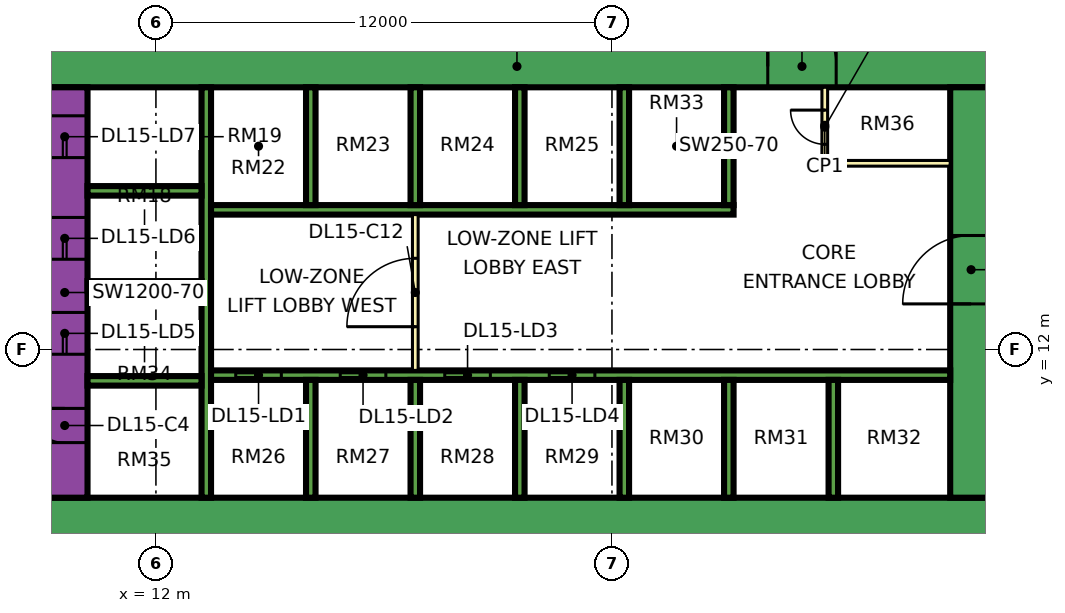
"""IFC4 building model, lengths in metres.
Left out: names, types, materials, properties, quantities, classifications, styles, units other than length and angle.
Written with IfcOpenShell. Run it as: python <this file> out.ifc"""

import sys

from ifc_helpers import new_model, si_unit, direction, frame, frame_2d, origin, place, context, subcontext, project, spatial, rectangle, extrude, element, fill, save


model = new_model("IFC4")
c1 = context("Model", 3, precision=1e-05, world=origin(), true_north=direction((0.0, 1.0)))
c2 = subcontext(c1, "Body", "Model", "MODEL_VIEW")
j1 = project(units=[si_unit("LENGTHUNIT", "METRE"), si_unit("PLANEANGLEUNIT", "RADIAN")], contexts=[c1])
p1 = place(None, origin())
s1 = spatial("IfcSite", under=j1, at=p1, CompositionType="ELEMENT")
p2 = place(p1, origin())
s2 = spatial("IfcBuilding", under=s1, at=p2, CompositionType="ELEMENT")
p3 = place(p2, frame((0.0, 0.0, 71.4)))
s3 = spatial("IfcBuildingStorey", under=s2, at=p3, CompositionType="ELEMENT", Elevation=71.4)
p4 = place(p3, frame((9.0, 7.55, 0.0), z_axis=(0.0, 0.0, 1.0), x_axis=(1.0, 0.0, 0.0)))
e1 = element("IfcWall", 1, at=p4, inside=s3, PredefinedType="SHEAR", context=c2, shape_type="SweptSolid", body=[
    extrude(rectangle(XDim=25.0, YDim=1.1, at=frame_2d((12.5, 0.0))), origin(), (0.0, 0.0, 1.0), 3.75),
])
p5 = place(p3, frame((9.0, 19.45, 0.0), z_axis=(0.0, 0.0, 1.0), x_axis=(1.0, 0.0, 0.0)))
e2 = element("IfcWall", 2, at=p5, inside=s3, PredefinedType="SHEAR", context=c2, shape_type="SweptSolid", body=[
    extrude(rectangle(XDim=25.0, YDim=1.1, at=frame_2d((12.5, 0.0))), origin(), (0.0, 0.0, 1.0), 3.75),
])
p6 = place(p5, frame((19.1, 0.0, 0.0)))
e3 = element("IfcOpeningElement", 3, at=p6, cuts=e2, PredefinedType="OPENING", context=c2, shape_type="SweptSolid", body=[
    extrude(rectangle(XDim=1.8, YDim=2.4, at=frame_2d((0.9, 1.2))), frame((0.0, 0.56, 0.0), z_axis=(0.0, -1.0, 0.0), x_axis=(1.0, 0.0, 0.0)), (0.0, 0.0, 1.0), 1.12),
])
p7 = place(p3, frame((9.6, 8.1, 0.0), z_axis=(0.0, 0.0, 1.0), x_axis=(0.0, 1.0, 0.0)))
e4 = element("IfcWall", 4, at=p7, inside=s3, PredefinedType="SHEAR", context=c2, shape_type="SweptSolid", body=[
    extrude(rectangle(XDim=10.8, YDim=1.2, at=frame_2d((5.4, 0.0))), origin(), (0.0, 0.0, 1.0), 3.75),
])
p8 = place(p7, frame((3.775, 0.0, 0.0)))
e5 = element("IfcOpeningElement", 5, at=p8, cuts=e4, PredefinedType="OPENING", context=c2, shape_type="SweptSolid", body=[
    extrude(rectangle(XDim=1.1, YDim=2.2, at=frame_2d((0.55, 1.1))), frame((0.0, 0.61, 0.0), z_axis=(0.0, -1.0, 0.0), x_axis=(1.0, 0.0, 0.0)), (0.0, 0.0, 1.0), 1.22),
])
p9 = place(p7, frame((6.275, 0.0, 0.0)))
e6 = element("IfcOpeningElement", 6, at=p9, cuts=e4, PredefinedType="OPENING", context=c2, shape_type="SweptSolid", body=[
    extrude(rectangle(XDim=1.1, YDim=2.2, at=frame_2d((0.55, 1.1))), frame((0.0, 0.61, 0.0), z_axis=(0.0, -1.0, 0.0), x_axis=(1.0, 0.0, 0.0)), (0.0, 0.0, 1.0), 1.22),
])
p10 = place(p7, frame((8.95, 0.0, 0.0)))
e7 = element("IfcOpeningElement", 7, at=p10, cuts=e4, PredefinedType="OPENING", context=c2, shape_type="SweptSolid", body=[
    extrude(rectangle(XDim=1.1, YDim=2.2, at=frame_2d((0.55, 1.1))), frame((0.0, 0.61, 0.0), z_axis=(0.0, -1.0, 0.0), x_axis=(1.0, 0.0, 0.0)), (0.0, 0.0, 1.0), 1.22),
])
p11 = place(p7, frame((1.45, 0.0, 0.0)))
e8 = element("IfcOpeningElement", 8, at=p11, cuts=e4, PredefinedType="OPENING", context=c2, shape_type="SweptSolid", body=[
    extrude(rectangle(XDim=0.9, YDim=2.1, at=frame_2d((0.45, 1.05))), frame((0.0, 0.61, 0.0), z_axis=(0.0, -1.0, 0.0), x_axis=(1.0, 0.0, 0.0)), (0.0, 0.0, 1.0), 1.22),
])
p12 = place(p3, frame((33.45, 8.1, 0.0), z_axis=(0.0, 0.0, 1.0), x_axis=(0.0, 1.0, 0.0)))
e9 = element("IfcWall", 9, at=p12, inside=s3, PredefinedType="SHEAR", context=c2, shape_type="SweptSolid", body=[
    extrude(rectangle(XDim=10.8, YDim=1.1, at=frame_2d((5.4, 0.0))), origin(), (0.0, 0.0, 1.0), 3.75),
])
p13 = place(p12, frame((5.1, 0.0, 0.0)))
e10 = element("IfcOpeningElement", 10, at=p13, cuts=e9, PredefinedType="OPENING", context=c2, shape_type="SweptSolid", body=[
    extrude(rectangle(XDim=1.8, YDim=2.4, at=frame_2d((0.9, 1.2))), frame((0.0, 0.56, 0.0), z_axis=(0.0, -1.0, 0.0), x_axis=(1.0, 0.0, 0.0)), (0.0, 0.0, 1.0), 1.12),
])
p14 = place(p3, frame((13.325, 8.1, 0.0), z_axis=(0.0, 0.0, 1.0), x_axis=(0.0, 1.0, 0.0)))
e11 = element("IfcWall", 11, at=p14, inside=s3, PredefinedType="SHEAR", context=c2, shape_type="SweptSolid", body=[
    extrude(rectangle(XDim=10.8, YDim=0.25, at=frame_2d((5.4, 0.0))), origin(), (0.0, 0.0, 1.0), 3.75),
])
p15 = place(p3, frame((13.45, 11.325, 0.0), z_axis=(0.0, 0.0, 1.0), x_axis=(1.0, 0.0, 0.0)))
e12 = element("IfcWall", 12, at=p15, inside=s3, PredefinedType="SHEAR", context=c2, shape_type="SweptSolid", body=[
    extrude(rectangle(XDim=19.45, YDim=0.25, at=frame_2d((9.725, 0.0))), origin(), (0.0, 0.0, 1.0), 3.75),
])
p16 = place(p15, frame((0.65, 0.0, 0.0)))
e13 = element("IfcOpeningElement", 13, at=p16, cuts=e12, PredefinedType="OPENING", context=c2, shape_type="SweptSolid", body=[
    extrude(rectangle(XDim=1.2, YDim=2.2, at=frame_2d((0.6, 1.1))), frame((0.0, 0.135, 0.0), z_axis=(0.0, -1.0, 0.0), x_axis=(1.0, 0.0, 0.0)), (0.0, 0.0, 1.0), 0.27),
])
p17 = place(p15, frame((3.4, 0.0, 0.0)))
e14 = element("IfcOpeningElement", 14, at=p17, cuts=e12, PredefinedType="OPENING", context=c2, shape_type="SweptSolid", body=[
    extrude(rectangle(XDim=1.2, YDim=2.2, at=frame_2d((0.6, 1.1))), frame((0.0, 0.135, 0.0), z_axis=(0.0, -1.0, 0.0), x_axis=(1.0, 0.0, 0.0)), (0.0, 0.0, 1.0), 0.27),
])
p18 = place(p15, frame((6.15, 0.0, 0.0)))
e15 = element("IfcOpeningElement", 15, at=p18, cuts=e12, PredefinedType="OPENING", context=c2, shape_type="SweptSolid", body=[
    extrude(rectangle(XDim=1.2, YDim=2.2, at=frame_2d((0.6, 1.1))), frame((0.0, 0.135, 0.0), z_axis=(0.0, -1.0, 0.0), x_axis=(1.0, 0.0, 0.0)), (0.0, 0.0, 1.0), 0.27),
])
p19 = place(p15, frame((8.9, 0.0, 0.0)))
e16 = element("IfcOpeningElement", 16, at=p19, cuts=e12, PredefinedType="OPENING", context=c2, shape_type="SweptSolid", body=[
    extrude(rectangle(XDim=1.2, YDim=2.2, at=frame_2d((0.6, 1.1))), frame((0.0, 0.135, 0.0), z_axis=(0.0, -1.0, 0.0), x_axis=(1.0, 0.0, 0.0)), (0.0, 0.0, 1.0), 0.27),
])
p20 = place(p3, frame((13.45, 15.675, 0.0), z_axis=(0.0, 0.0, 1.0), x_axis=(1.0, 0.0, 0.0)))
e17 = element("IfcWall", 17, at=p20, inside=s3, PredefinedType="SHEAR", context=c2, shape_type="SweptSolid", body=[
    extrude(rectangle(XDim=13.75, YDim=0.25, at=frame_2d((6.875, 0.0))), origin(), (0.0, 0.0, 1.0), 3.75),
])
for number, where, z_axis, x_axis in (
    (18, (10.2, 11.175, 0.0), (0.0, 0.0, 1.0), (1.0, 0.0, 0.0)),
    (19, (10.2, 13.675, 0.0), (0.0, 0.0, 1.0), (1.0, 0.0, 0.0)),
    (20, (10.2, 16.175, 0.0), (0.0, 0.0, 1.0), (1.0, 0.0, 0.0)),
):
    element("IfcWall", number, at=place(p3, frame(where, z_axis=z_axis, x_axis=x_axis)), inside=s3, PredefinedType="SHEAR", context=c2, shape_type="SweptSolid", body=[
        extrude(rectangle(XDim=3.0, YDim=0.25, at=frame_2d((1.5, 0.0))), origin(), (0.0, 0.0, 1.0), 3.75),
    ])
for number, where, z_axis, x_axis in (
    (21, (16.075, 8.1, 0.0), (0.0, 0.0, 1.0), (0.0, 1.0, 0.0)),
    (22, (18.825, 8.1, 0.0), (0.0, 0.0, 1.0), (0.0, 1.0, 0.0)),
    (23, (21.575, 8.1, 0.0), (0.0, 0.0, 1.0), (0.0, 1.0, 0.0)),
    (24, (24.325, 8.1, 0.0), (0.0, 0.0, 1.0), (0.0, 1.0, 0.0)),
    (25, (27.075, 8.1, 0.0), (0.0, 0.0, 1.0), (0.0, 1.0, 0.0)),
    (26, (29.825, 8.1, 0.0), (0.0, 0.0, 1.0), (0.0, 1.0, 0.0)),
    (27, (16.075, 15.8, 0.0), (0.0, 0.0, 1.0), (0.0, 1.0, 0.0)),
    (28, (18.825, 15.8, 0.0), (0.0, 0.0, 1.0), (0.0, 1.0, 0.0)),
    (29, (21.575, 15.8, 0.0), (0.0, 0.0, 1.0), (0.0, 1.0, 0.0)),
    (30, (24.325, 15.8, 0.0), (0.0, 0.0, 1.0), (0.0, 1.0, 0.0)),
    (31, (27.075, 15.8, 0.0), (0.0, 0.0, 1.0), (0.0, 1.0, 0.0)),
):
    element("IfcWall", number, at=place(p3, frame(where, z_axis=z_axis, x_axis=x_axis)), inside=s3, PredefinedType="SHEAR", context=c2, shape_type="SweptSolid", body=[
        extrude(rectangle(XDim=3.1, YDim=0.25, at=frame_2d((1.55, 0.0))), origin(), (0.0, 0.0, 1.0), 3.75),
    ])
p21 = place(p3, frame((-1.447, 12.553, 0.0), z_axis=(0.0, 0.0, 1.0), x_axis=(0.707106781187, -0.707106781187, 0.0)))
e32 = element("IfcWall", 32, at=p21, inside=s3, PredefinedType="SOLIDWALL", context=c2, shape_type="SweptSolid", body=[
    extrude(rectangle(XDim=19.799, YDim=0.15, at=frame_2d((9.899, 0.0))), origin(), (0.0, 0.0, 1.0), 3.35),
])
p22 = place(p21, frame((2.212, 0.0, 0.45)))
e33 = element("IfcOpeningElement", 33, at=p22, cuts=e32, PredefinedType="OPENING", context=c2, shape_type="SweptSolid", body=[
    extrude(rectangle(XDim=3.0, YDim=2.4, at=frame_2d((1.5, 1.2))), frame((0.0, 0.085, 0.0), z_axis=(0.0, -1.0, 0.0), x_axis=(1.0, 0.0, 0.0)), (0.0, 0.0, 1.0), 0.17),
])
p23 = place(p21, frame((10.216, 0.0, 0.45)))
e34 = element("IfcOpeningElement", 34, at=p23, cuts=e32, PredefinedType="OPENING", context=c2, shape_type="SweptSolid", body=[
    extrude(rectangle(XDim=3.0, YDim=2.4, at=frame_2d((1.5, 1.2))), frame((0.0, 0.085, 0.0), z_axis=(0.0, -1.0, 0.0), x_axis=(1.0, 0.0, 0.0)), (0.0, 0.0, 1.0), 0.17),
])
p24 = place(p3, frame((18.825, 11.45, 0.0), z_axis=(0.0, 0.0, 1.0), x_axis=(0.0, 1.0, 0.0)))
e35 = element("IfcWall", 35, at=p24, inside=s3, PredefinedType="PARTITIONING", context=c2, shape_type="SweptSolid", body=[
    extrude(rectangle(XDim=4.1, YDim=0.15, at=frame_2d((2.05, 0.0))), origin(), (0.0, 0.0, 1.0), 3.35),
])
p25 = place(p24, frame((1.15, 0.0, 0.0)))
e36 = element("IfcOpeningElement", 36, at=p25, cuts=e35, PredefinedType="OPENING", context=c2, shape_type="SweptSolid", body=[
    extrude(rectangle(XDim=1.8, YDim=2.4, at=frame_2d((0.9, 1.2))), frame((0.0, 0.085, 0.0), z_axis=(0.0, -1.0, 0.0), x_axis=(1.0, 0.0, 0.0)), (0.0, 0.0, 1.0), 0.17),
])
p26 = place(p3, frame((29.6, 16.9, 0.0), z_axis=(0.0, 0.0, 1.0), x_axis=(0.0, 1.0, 0.0)))
e37 = element("IfcWall", 37, at=p26, inside=s3, PredefinedType="PARTITIONING", context=c2, shape_type="SweptSolid", body=[
    extrude(rectangle(XDim=2.0, YDim=0.15, at=frame_2d((1.0, 0.0))), origin(), (0.0, 0.0, 1.0), 3.35),
])
p27 = place(p26, frame((0.5, 0.0, 0.0)))
e38 = element("IfcOpeningElement", 38, at=p27, cuts=e37, PredefinedType="OPENING", context=c2, shape_type="SweptSolid", body=[
    extrude(rectangle(XDim=0.9, YDim=2.1, at=frame_2d((0.45, 1.05))), frame((0.0, 0.085, 0.0), z_axis=(0.0, -1.0, 0.0), x_axis=(1.0, 0.0, 0.0)), (0.0, 0.0, 1.0), 0.17),
])
p28 = place(p3, frame((29.6, 16.9, 0.0), z_axis=(0.0, 0.0, 1.0), x_axis=(1.0, 0.0, 0.0)))
e39 = element("IfcWall", 39, at=p28, inside=s3, PredefinedType="PARTITIONING", context=c2, shape_type="SweptSolid", body=[
    extrude(rectangle(XDim=3.3, YDim=0.15, at=frame_2d((1.65, 0.0))), origin(), (0.0, 0.0, 1.0), 3.35),
])
p29 = place(p16, origin())
e40 = element("IfcDoor", 40, at=p29, inside=s3, OperationType="DOUBLE_DOOR_SLIDING", PredefinedType="DOOR", context=c2, shape_type="SweptSolid", body=[
    extrude(rectangle(XDim=1.2, YDim=2.2, at=frame_2d((0.6, 1.1))), frame((0.0, 0.025, 0.0), z_axis=(0.0, -1.0, 0.0), x_axis=(1.0, 0.0, 0.0)), (0.0, 0.0, 1.0), 0.05),
])
fill(e13, e40)
p30 = place(p17, origin())
e41 = element("IfcDoor", 41, at=p30, inside=s3, OperationType="DOUBLE_DOOR_SLIDING", PredefinedType="DOOR", context=c2, shape_type="SweptSolid", body=[
    extrude(rectangle(XDim=1.2, YDim=2.2, at=frame_2d((0.6, 1.1))), frame((0.0, 0.025, 0.0), z_axis=(0.0, -1.0, 0.0), x_axis=(1.0, 0.0, 0.0)), (0.0, 0.0, 1.0), 0.05),
])
fill(e14, e41)
p31 = place(p18, origin())
e42 = element("IfcDoor", 42, at=p31, inside=s3, OperationType="DOUBLE_DOOR_SLIDING", PredefinedType="DOOR", context=c2, shape_type="SweptSolid", body=[
    extrude(rectangle(XDim=1.2, YDim=2.2, at=frame_2d((0.6, 1.1))), frame((0.0, 0.025, 0.0), z_axis=(0.0, -1.0, 0.0), x_axis=(1.0, 0.0, 0.0)), (0.0, 0.0, 1.0), 0.05),
])
fill(e15, e42)
p32 = place(p19, origin())
e43 = element("IfcDoor", 43, at=p32, inside=s3, OperationType="DOUBLE_DOOR_SLIDING", PredefinedType="DOOR", context=c2, shape_type="SweptSolid", body=[
    extrude(rectangle(XDim=1.2, YDim=2.2, at=frame_2d((0.6, 1.1))), frame((0.0, 0.025, 0.0), z_axis=(0.0, -1.0, 0.0), x_axis=(1.0, 0.0, 0.0)), (0.0, 0.0, 1.0), 0.05),
])
fill(e16, e43)
p33 = place(p8, origin())
e44 = element("IfcDoor", 44, at=p33, inside=s3, OperationType="DOUBLE_DOOR_SLIDING", PredefinedType="DOOR", context=c2, shape_type="SweptSolid", body=[
    extrude(rectangle(XDim=1.1, YDim=2.2, at=frame_2d((0.55, 1.1))), frame((0.0, 0.025, 0.0), z_axis=(0.0, -1.0, 0.0), x_axis=(1.0, 0.0, 0.0)), (0.0, 0.0, 1.0), 0.05),
])
fill(e5, e44)
p34 = place(p9, origin())
e45 = element("IfcDoor", 45, at=p34, inside=s3, OperationType="DOUBLE_DOOR_SLIDING", PredefinedType="DOOR", context=c2, shape_type="SweptSolid", body=[
    extrude(rectangle(XDim=1.1, YDim=2.2, at=frame_2d((0.55, 1.1))), frame((0.0, 0.025, 0.0), z_axis=(0.0, -1.0, 0.0), x_axis=(1.0, 0.0, 0.0)), (0.0, 0.0, 1.0), 0.05),
])
fill(e6, e45)
p35 = place(p10, origin())
e46 = element("IfcDoor", 46, at=p35, inside=s3, OperationType="DOUBLE_DOOR_SLIDING", PredefinedType="DOOR", context=c2, shape_type="SweptSolid", body=[
    extrude(rectangle(XDim=1.1, YDim=2.2, at=frame_2d((0.55, 1.1))), frame((0.0, 0.025, 0.0), z_axis=(0.0, -1.0, 0.0), x_axis=(1.0, 0.0, 0.0)), (0.0, 0.0, 1.0), 0.05),
])
fill(e7, e46)
p36 = place(p13, origin())
e47 = element("IfcDoor", 47, at=p36, inside=s3, OperationType="DOUBLE_DOOR_SINGLE_SWING", PredefinedType="DOOR", context=c2, shape_type="SweptSolid", body=[
    extrude(rectangle(XDim=1.8, YDim=2.4, at=frame_2d((0.9, 1.2))), frame((0.0, 0.025, 0.0), z_axis=(0.0, -1.0, 0.0), x_axis=(1.0, 0.0, 0.0)), (0.0, 0.0, 1.0), 0.05),
])
fill(e10, e47)
p37 = place(p6, origin())
e48 = element("IfcDoor", 48, at=p37, inside=s3, OperationType="DOUBLE_DOOR_SINGLE_SWING", PredefinedType="DOOR", context=c2, shape_type="SweptSolid", body=[
    extrude(rectangle(XDim=1.8, YDim=2.4, at=frame_2d((0.9, 1.2))), frame((0.0, 0.025, 0.0), z_axis=(0.0, -1.0, 0.0), x_axis=(1.0, 0.0, 0.0)), (0.0, 0.0, 1.0), 0.05),
])
fill(e3, e48)
p38 = place(p11, frame((0.9, 0.0, 0.0), z_axis=(0.0, 0.0, 1.0), x_axis=(-1.0, 0.0, 0.0)))
e49 = element("IfcDoor", 49, at=p38, inside=s3, OperationType="SINGLE_SWING_RIGHT", PredefinedType="DOOR", context=c2, shape_type="SweptSolid", body=[
    extrude(rectangle(XDim=0.9, YDim=2.1, at=frame_2d((0.45, 1.05))), frame((0.0, 0.025, 0.0), z_axis=(0.0, -1.0, 0.0), x_axis=(1.0, 0.0, 0.0)), (0.0, 0.0, 1.0), 0.05),
])
fill(e8, e49)
p39 = place(p25, origin())
e50 = element("IfcDoor", 50, at=p39, inside=s3, OperationType="DOUBLE_DOOR_SINGLE_SWING", PredefinedType="DOOR", context=c2, shape_type="SweptSolid", body=[
    extrude(rectangle(XDim=1.8, YDim=2.4, at=frame_2d((0.9, 1.2))), frame((0.0, 0.025, 0.0), z_axis=(0.0, -1.0, 0.0), x_axis=(1.0, 0.0, 0.0)), (0.0, 0.0, 1.0), 0.05),
])
fill(e36, e50)
p40 = place(p27, frame((0.9, 0.0, 0.0), z_axis=(0.0, 0.0, 1.0), x_axis=(-1.0, 0.0, 0.0)))
e51 = element("IfcDoor", 51, at=p40, inside=s3, OperationType="SINGLE_SWING_RIGHT", PredefinedType="DOOR", context=c2, shape_type="SweptSolid", body=[
    extrude(rectangle(XDim=0.9, YDim=2.1, at=frame_2d((0.45, 1.05))), frame((0.0, 0.025, 0.0), z_axis=(0.0, -1.0, 0.0), x_axis=(1.0, 0.0, 0.0)), (0.0, 0.0, 1.0), 0.05),
])
fill(e38, e51)
save(model, sys.argv[1])
